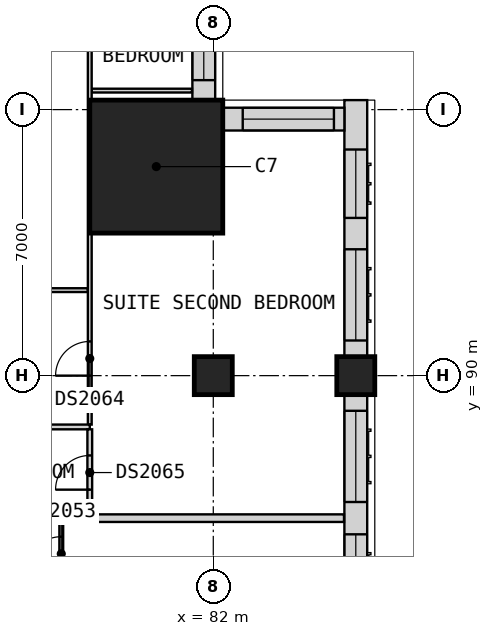
"""IFC4 building model, lengths in metres.
Left out: names, types, materials, properties, quantities, classifications, styles, units other than length and angle.
Written with IfcOpenShell. Run it as: python <this file> out.ifc"""

import sys

from ifc_helpers import new_model, si_unit, direction, frame, frame_2d, origin, origin_2d, place, context, subcontext, project, spatial, rectangle, extrude, element, fill, save


model = new_model("IFC4")
c1 = context("Model", 3, precision=1e-05, world=origin(), true_north=direction((0.0, 1.0)))
c2 = subcontext(c1, "Body", "Model", "MODEL_VIEW")
j1 = project(units=[si_unit("LENGTHUNIT", "METRE"), si_unit("PLANEANGLEUNIT", "RADIAN")], contexts=[c1])
p1 = place(None, origin())
s1 = spatial("IfcSite", under=j1, at=p1, CompositionType="ELEMENT")
p2 = place(p1, origin())
s2 = spatial("IfcBuilding", under=s1, at=p2, CompositionType="ELEMENT")
p3 = place(p2, frame((0.0, 0.0, 162.6)))
s3 = spatial("IfcBuildingStorey", under=s2, at=p3, CompositionType="ELEMENT", Elevation=162.6)
for number, where, z_axis, x_axis in (
    (1, (85.75, 90.0, 0.0), (0.0, 0.0, 1.0), (1.0, 0.0, 0.0)),
    (2, (82.0, 90.0, 0.0), (0.0, 0.0, 1.0), (1.0, 0.0, 0.0)),
):
    element("IfcColumn", number, at=place(p3, frame(where, z_axis=z_axis, x_axis=x_axis)), inside=s3, PredefinedType="COLUMN", context=c2, shape_type="SweptSolid", body=[
        extrude(rectangle(XDim=1.0, YDim=1.0, at=origin_2d()), origin(), (0.0, 0.0, 1.0), 3.6),
    ])
p4 = place(p3, frame((80.5, 95.5, 0.0), z_axis=(0.0, 0.0, 1.0), x_axis=(1.0, 0.0, 0.0)))
e3 = element("IfcColumn", 3, at=p4, inside=s3, PredefinedType="COLUMN", context=c2, shape_type="SweptSolid", body=[
    extrude(rectangle(XDim=3.5, YDim=3.5, at=origin_2d()), origin(), (0.0, 0.0, 1.0), 3.6),
])
p5 = place(p3, frame((85.75, 83.0, 0.0), z_axis=(0.0, 0.0, 1.0), x_axis=(0.0, 1.0, 0.0)))
e4 = element("IfcWall", 4, at=p5, inside=s3, PredefinedType="SOLIDWALL", context=c2, shape_type="SweptSolid", body=[
    extrude(rectangle(XDim=6.5, YDim=0.6, at=frame_2d((3.25, 0.0))), origin(), (0.0, 0.0, 1.0), 2.85),
])
p6 = place(p5, frame((0.425, 0.0, 0.8)))
e5 = element("IfcOpeningElement", 5, at=p6, cuts=e4, PredefinedType="OPENING", context=c2, shape_type="SweptSolid", body=[
    extrude(rectangle(XDim=2.4, YDim=1.8, at=frame_2d((1.2, 0.9))), frame((0.0, 0.31, 0.0), z_axis=(0.0, -1.0, 0.0), x_axis=(1.0, 0.0, 0.0)), (0.0, 0.0, 1.0), 0.62),
])
p7 = place(p5, frame((3.675, 0.0, 0.8)))
e6 = element("IfcOpeningElement", 6, at=p7, cuts=e4, PredefinedType="OPENING", context=c2, shape_type="SweptSolid", body=[
    extrude(rectangle(XDim=2.4, YDim=1.8, at=frame_2d((1.2, 0.9))), frame((0.0, 0.31, 0.0), z_axis=(0.0, -1.0, 0.0), x_axis=(1.0, 0.0, 0.0)), (0.0, 0.0, 1.0), 0.62),
])
p8 = place(p3, frame((85.75, 90.5, 0.0), z_axis=(0.0, 0.0, 1.0), x_axis=(0.0, 1.0, 0.0)))
e7 = element("IfcWall", 7, at=p8, inside=s3, PredefinedType="SOLIDWALL", context=c2, shape_type="SweptSolid", body=[
    extrude(rectangle(XDim=6.75, YDim=0.6, at=frame_2d((3.375, 0.0))), origin(), (0.0, 0.0, 1.0), 2.85),
])
p9 = place(p8, frame((0.425, 0.0, 0.8)))
e8 = element("IfcOpeningElement", 8, at=p9, cuts=e7, PredefinedType="OPENING", context=c2, shape_type="SweptSolid", body=[
    extrude(rectangle(XDim=2.4, YDim=1.8, at=frame_2d((1.2, 0.9))), frame((0.0, 0.31, 0.0), z_axis=(0.0, -1.0, 0.0), x_axis=(1.0, 0.0, 0.0)), (0.0, 0.0, 1.0), 0.62),
])
p10 = place(p8, frame((3.65, 0.0, 0.8)))
e9 = element("IfcOpeningElement", 9, at=p10, cuts=e7, PredefinedType="OPENING", context=c2, shape_type="SweptSolid", body=[
    extrude(rectangle(XDim=1.8, YDim=1.8, at=frame_2d((0.9, 0.9))), frame((0.0, 0.31, 0.0), z_axis=(0.0, -1.0, 0.0), x_axis=(1.0, 0.0, 0.0)), (0.0, 0.0, 1.0), 0.62),
])
p11 = place(p3, frame((85.45, 96.75, 0.0), z_axis=(0.0, 0.0, 1.0), x_axis=(-1.0, 0.0, 0.0)))
e10 = element("IfcWall", 10, at=p11, inside=s3, PredefinedType="SOLIDWALL", context=c2, shape_type="SweptSolid", body=[
    extrude(rectangle(XDim=3.2, YDim=0.6, at=frame_2d((1.6, 0.0))), origin(), (0.0, 0.0, 1.0), 3.2),
])
p12 = place(p11, frame((0.275, 0.0, 0.8)))
e11 = element("IfcOpeningElement", 11, at=p12, cuts=e10, PredefinedType="OPENING", context=c2, shape_type="SweptSolid", body=[
    extrude(rectangle(XDim=2.4, YDim=1.8, at=frame_2d((1.2, 0.9))), frame((0.0, 0.31, 0.0), z_axis=(0.0, -1.0, 0.0), x_axis=(1.0, 0.0, 0.0)), (0.0, 0.0, 1.0), 0.62),
])
p13 = place(p3, frame((81.75, 97.25, 0.0), z_axis=(0.0, 0.0, 1.0), x_axis=(0.0, 1.0, 0.0)))
e12 = element("IfcWall", 12, at=p13, inside=s3, PredefinedType="SOLIDWALL", context=c2, shape_type="SweptSolid", body=[
    extrude(rectangle(XDim=3.2, YDim=0.6, at=frame_2d((1.6, 0.0))), origin(), (0.0, 0.0, 1.0), 3.2),
])
p14 = place(p13, frame((0.525, 0.0, 0.8)))
e13 = element("IfcOpeningElement", 13, at=p14, cuts=e12, PredefinedType="OPENING", context=c2, shape_type="SweptSolid", body=[
    extrude(rectangle(XDim=2.4, YDim=1.8, at=frame_2d((1.2, 0.9))), frame((0.0, 0.31, 0.0), z_axis=(0.0, -1.0, 0.0), x_axis=(1.0, 0.0, 0.0)), (0.0, 0.0, 1.0), 0.62),
])
p15 = place(p3, frame((73.725, 86.25, 0.0), z_axis=(0.0, 0.0, 1.0), x_axis=(1.0, 0.0, 0.0)))
e14 = element("IfcWall", 14, at=p15, inside=s3, PredefinedType="PARTITIONING", context=c2, shape_type="SweptSolid", body=[
    extrude(rectangle(XDim=11.715, YDim=0.2, at=frame_2d((5.857, 0.0))), origin(), (0.0, 0.0, 1.0), 3.2),
])
p16 = place(p3, frame((71.35, 92.25, 0.0), z_axis=(0.0, 0.0, 1.0), x_axis=(1.0, 0.0, 0.0)))
e15 = element("IfcWall", 15, at=p16, inside=s3, PredefinedType="PARTITIONING", context=c2, shape_type="SweptSolid", body=[
    extrude(rectangle(XDim=7.35, YDim=0.1, at=frame_2d((3.675, 0.0))), origin(), (0.0, 0.0, 1.0), 3.2),
])
p17 = place(p16, frame((0.65, 0.0, 0.0)))
e16 = element("IfcOpeningElement", 16, at=p17, cuts=e15, PredefinedType="OPENING", context=c2, shape_type="SweptSolid", body=[
    extrude(rectangle(XDim=0.9, YDim=2.1, at=frame_2d((0.45, 1.05))), frame((0.0, 0.06, 0.0), z_axis=(0.0, -1.0, 0.0), x_axis=(1.0, 0.0, 0.0)), (0.0, 0.0, 1.0), 0.12),
])
p18 = place(p3, frame((78.8, 97.5, 0.0), z_axis=(0.0, 0.0, 1.0), x_axis=(1.0, 0.0, 0.0)))
e17 = element("IfcWall", 17, at=p18, inside=s3, PredefinedType="PARTITIONING", context=c2, shape_type="SweptSolid", body=[
    extrude(rectangle(XDim=2.64, YDim=0.1, at=frame_2d((1.32, 0.0))), origin(), (0.0, 0.0, 1.0), 3.2),
])
p19 = place(p3, frame((78.0, 84.438, 0.0), z_axis=(0.0, 0.0, 1.0), x_axis=(0.0, 1.0, 0.0)))
e18 = element("IfcWall", 18, at=p19, inside=s3, PredefinedType="PARTITIONING", context=c2, shape_type="SweptSolid", body=[
    extrude(rectangle(XDim=1.712, YDim=0.1, at=frame_2d((0.856, 0.0))), origin(), (0.0, 0.0, 1.0), 3.2),
])
p20 = place(p19, frame((0.425, 0.0, 0.0)))
e19 = element("IfcOpeningElement", 19, at=p20, cuts=e18, PredefinedType="OPENING", context=c2, shape_type="SweptSolid", body=[
    extrude(rectangle(XDim=0.9, YDim=2.1, at=frame_2d((0.45, 1.05))), frame((0.0, 0.06, 0.0), z_axis=(0.0, -1.0, 0.0), x_axis=(1.0, 0.0, 0.0)), (0.0, 0.0, 1.0), 0.12),
])
p21 = place(p3, frame((78.75, 88.712, 0.0), z_axis=(0.0, 0.0, 1.0), x_axis=(0.0, 1.0, 0.0)))
e20 = element("IfcWall", 20, at=p21, inside=s3, PredefinedType="PARTITIONING", context=c2, shape_type="SweptSolid", body=[
    extrude(rectangle(XDim=11.728, YDim=0.1, at=frame_2d((5.864, 0.0))), origin(), (0.0, 0.0, 1.0), 3.2),
])
p22 = place(p21, frame((10.212, 0.0, 0.0)))
e21 = element("IfcOpeningElement", 21, at=p22, cuts=e20, PredefinedType="OPENING", context=c2, shape_type="SweptSolid", body=[
    extrude(rectangle(XDim=0.9, YDim=2.1, at=frame_2d((0.45, 1.05))), frame((0.0, 0.06, 0.0), z_axis=(0.0, -1.0, 0.0), x_axis=(1.0, 0.0, 0.0)), (0.0, 0.0, 1.0), 0.12),
])
p23 = place(p21, frame((1.288, 0.0, 0.0)))
e22 = element("IfcOpeningElement", 22, at=p23, cuts=e20, PredefinedType="OPENING", context=c2, shape_type="SweptSolid", body=[
    extrude(rectangle(XDim=0.9, YDim=2.1, at=frame_2d((0.45, 1.05))), frame((0.0, 0.06, 0.0), z_axis=(0.0, -1.0, 0.0), x_axis=(1.0, 0.0, 0.0)), (0.0, 0.0, 1.0), 0.12),
])
p24 = place(p3, frame((73.725, 88.65, 0.0), z_axis=(0.0, 0.0, 1.0), x_axis=(1.0, 0.0, 0.0)))
e23 = element("IfcWall", 23, at=p24, inside=s3, PredefinedType="PARTITIONING", context=c2, shape_type="SweptSolid", body=[
    extrude(rectangle(XDim=5.025, YDim=0.125, at=frame_2d((2.512, 0.0))), origin(), (0.0, 0.0, 1.0), 3.2),
])
p25 = place(p3, frame((78.75, 86.35, 0.0), z_axis=(0.0, 0.0, 1.0), x_axis=(0.0, 1.0, 0.0)))
e24 = element("IfcWall", 24, at=p25, inside=s3, PredefinedType="PARTITIONING", context=c2, shape_type="SweptSolid", body=[
    extrude(rectangle(XDim=2.237, YDim=0.125, at=frame_2d((1.119, 0.0))), origin(), (0.0, 0.0, 1.0), 3.2),
])
p26 = place(p25, frame((0.65, 0.0, 0.0)))
e25 = element("IfcOpeningElement", 25, at=p26, cuts=e24, PredefinedType="OPENING", context=c2, shape_type="SweptSolid", body=[
    extrude(rectangle(XDim=0.9, YDim=2.1, at=frame_2d((0.45, 1.05))), frame((0.0, 0.073, 0.0), z_axis=(0.0, -1.0, 0.0), x_axis=(1.0, 0.0, 0.0)), (0.0, 0.0, 1.0), 0.145),
])
p27 = place(p6, origin())
e26 = element("IfcWindow", 26, at=p27, inside=s3, PartitioningType="SINGLE_PANEL", PredefinedType="WINDOW", context=c2, shape_type="SweptSolid", body=[
    extrude(rectangle(XDim=2.4, YDim=1.8, at=frame_2d((1.2, 0.9))), frame((0.0, -0.07, 0.0), z_axis=(0.0, -1.0, 0.0), x_axis=(1.0, 0.0, 0.0)), (0.0, 0.0, 1.0), 0.06),
])
fill(e5, e26)
p28 = place(p7, origin())
e27 = element("IfcWindow", 27, at=p28, inside=s3, PartitioningType="SINGLE_PANEL", PredefinedType="WINDOW", context=c2, shape_type="SweptSolid", body=[
    extrude(rectangle(XDim=2.4, YDim=1.8, at=frame_2d((1.2, 0.9))), frame((0.0, -0.07, 0.0), z_axis=(0.0, -1.0, 0.0), x_axis=(1.0, 0.0, 0.0)), (0.0, 0.0, 1.0), 0.06),
])
fill(e6, e27)
p29 = place(p9, origin())
e28 = element("IfcWindow", 28, at=p29, inside=s3, PartitioningType="SINGLE_PANEL", PredefinedType="WINDOW", context=c2, shape_type="SweptSolid", body=[
    extrude(rectangle(XDim=2.4, YDim=1.8, at=frame_2d((1.2, 0.9))), frame((0.0, -0.07, 0.0), z_axis=(0.0, -1.0, 0.0), x_axis=(1.0, 0.0, 0.0)), (0.0, 0.0, 1.0), 0.06),
])
fill(e8, e28)
p30 = place(p10, origin())
e29 = element("IfcWindow", 29, at=p30, inside=s3, PartitioningType="SINGLE_PANEL", PredefinedType="WINDOW", context=c2, shape_type="SweptSolid", body=[
    extrude(rectangle(XDim=1.8, YDim=1.8, at=frame_2d((0.9, 0.9))), frame((0.0, -0.07, 0.0), z_axis=(0.0, -1.0, 0.0), x_axis=(1.0, 0.0, 0.0)), (0.0, 0.0, 1.0), 0.06),
])
fill(e9, e29)
p31 = place(p12, origin())
e30 = element("IfcWindow", 30, at=p31, inside=s3, PartitioningType="SINGLE_PANEL", PredefinedType="WINDOW", context=c2, shape_type="SweptSolid", body=[
    extrude(rectangle(XDim=2.4, YDim=1.8, at=frame_2d((1.2, 0.9))), frame((0.0, -0.07, 0.0), z_axis=(0.0, -1.0, 0.0), x_axis=(1.0, 0.0, 0.0)), (0.0, 0.0, 1.0), 0.06),
])
fill(e11, e30)
p32 = place(p14, origin())
e31 = element("IfcWindow", 31, at=p32, inside=s3, PartitioningType="SINGLE_PANEL", PredefinedType="WINDOW", context=c2, shape_type="SweptSolid", body=[
    extrude(rectangle(XDim=2.4, YDim=1.8, at=frame_2d((1.2, 0.9))), frame((0.0, -0.07, 0.0), z_axis=(0.0, -1.0, 0.0), x_axis=(1.0, 0.0, 0.0)), (0.0, 0.0, 1.0), 0.06),
])
fill(e13, e31)
p33 = place(p20, origin())
e32 = element("IfcDoor", 32, at=p33, inside=s3, OperationType="SINGLE_SWING_LEFT", PredefinedType="DOOR", context=c2, shape_type="SweptSolid", body=[
    extrude(rectangle(XDim=0.9, YDim=2.1, at=frame_2d((0.45, 1.05))), frame((0.0, 0.025, 0.0), z_axis=(0.0, -1.0, 0.0), x_axis=(1.0, 0.0, 0.0)), (0.0, 0.0, 1.0), 0.05),
])
fill(e19, e32)
p34 = place(p23, origin())
e33 = element("IfcDoor", 33, at=p34, inside=s3, OperationType="SINGLE_SWING_RIGHT", PredefinedType="DOOR", context=c2, shape_type="SweptSolid", body=[
    extrude(rectangle(XDim=0.9, YDim=2.1, at=frame_2d((0.45, 1.05))), frame((0.0, 0.025, 0.0), z_axis=(0.0, -1.0, 0.0), x_axis=(1.0, 0.0, 0.0)), (0.0, 0.0, 1.0), 0.05),
])
fill(e22, e33)
p35 = place(p26, origin())
e34 = element("IfcDoor", 34, at=p35, inside=s3, OperationType="SINGLE_SWING_LEFT", PredefinedType="DOOR", context=c2, shape_type="SweptSolid", body=[
    extrude(rectangle(XDim=0.9, YDim=2.1, at=frame_2d((0.45, 1.05))), frame((0.0, 0.025, 0.0), z_axis=(0.0, -1.0, 0.0), x_axis=(1.0, 0.0, 0.0)), (0.0, 0.0, 1.0), 0.05),
])
fill(e25, e34)
save(model, sys.argv[1])
